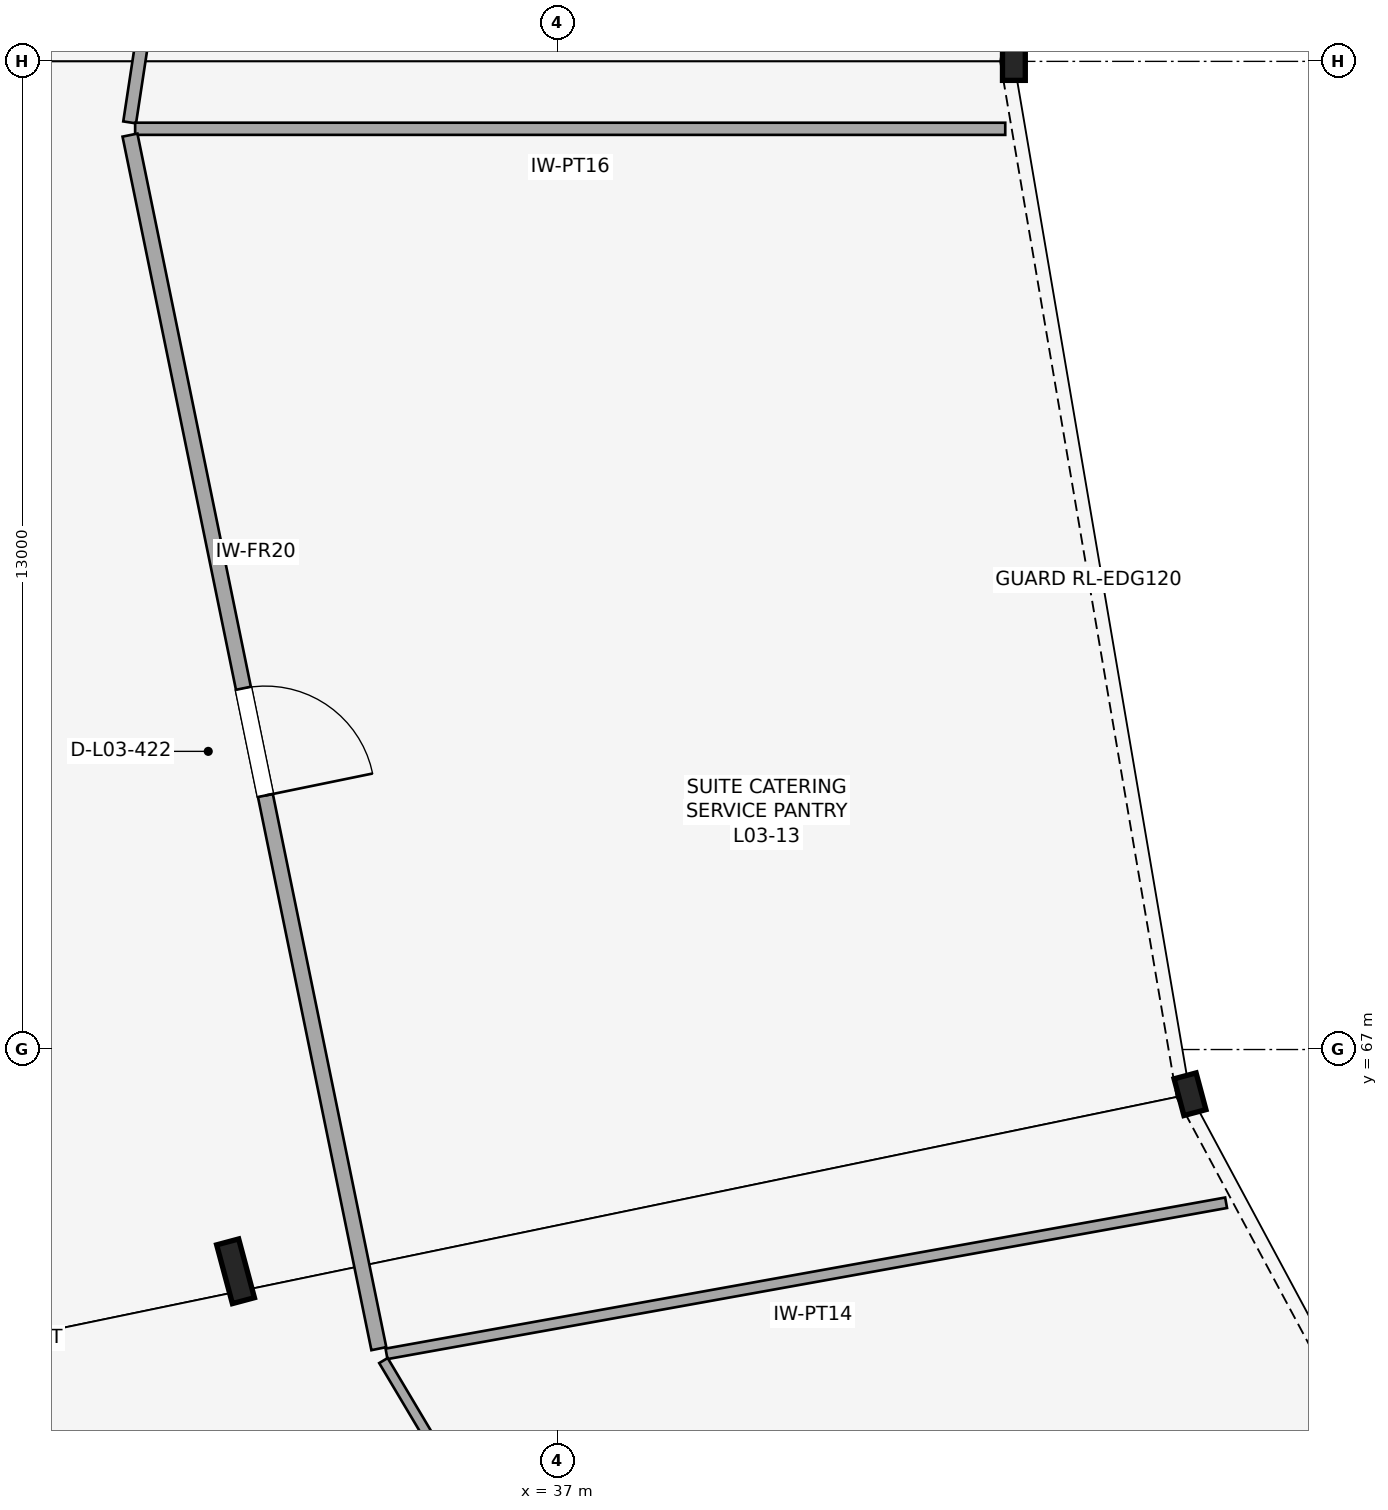
"""IFC4 building model, lengths in metres.
Left out: names, types, materials, properties, quantities, classifications, styles, units other than length and angle.
Written with IfcOpenShell. Run it as: python <this file> out.ifc"""

import sys

from ifc_helpers import new_model, si_unit, direction, frame, frame_2d, origin, origin_2d, place, context, subcontext, project, spatial, rectangle, i_section, extrude, element, fill, save


model = new_model("IFC4")
c1 = context("Model", 3, precision=1e-05, world=origin(), true_north=direction((0.0, 1.0)))
c2 = subcontext(c1, "Body", "Model", "MODEL_VIEW")
j1 = project(units=[si_unit("LENGTHUNIT", "METRE"), si_unit("PLANEANGLEUNIT", "RADIAN")], contexts=[c1])
p1 = place(None, origin())
s1 = spatial("IfcSite", under=j1, at=p1, CompositionType="ELEMENT")
p2 = place(p1, origin())
s2 = spatial("IfcBuilding", under=s1, at=p2, CompositionType="ELEMENT")
p3 = place(p2, frame((0.0, 0.0, 15.6)))
s3 = spatial("IfcBuildingStorey", under=s2, at=p3, CompositionType="ELEMENT", Elevation=15.6)
for number, where, z_axis, x_axis in (
    (1, (43.0, 80.0, 0.0), (0.0, 0.0, 1.0), (-1.0, 0.0, 0.0)),
    (2, (45.317, 66.412, 0.0), (0.0, 0.0, 1.0), (-0.966, -0.259, 0.0)),
):
    element("IfcColumn", number, at=place(p3, frame(where, z_axis=z_axis, x_axis=x_axis)), inside=s3, PredefinedType="COLUMN", context=c2, shape_type="SweptSolid", body=[
        extrude(i_section(OverallWidth=0.3, OverallDepth=0.5, WebThickness=0.014, FlangeThickness=0.028, FilletRadius=0.027, at=origin_2d()), origin(), (0.0, 0.0, 1.0), 3.48),
    ])
p4 = place(p3, frame((32.76, 64.083, 0.0), z_axis=(0.0, 0.0, 1.0), x_axis=(-0.965925826289, -0.258819045103, 0.0)))
e3 = element("IfcColumn", 3, at=p4, inside=s3, PredefinedType="COLUMN", context=c2, shape_type="SweptSolid", body=[
    extrude(i_section(OverallWidth=0.3, OverallDepth=0.8, WebThickness=0.018, FlangeThickness=0.033, FilletRadius=0.03, at=origin_2d()), origin(), (0.0, 0.0, 1.0), 5.2),
])
p5 = place(p3, frame((33.513, 93.309, 0.0), z_axis=(0.0, 0.0, 1.0), x_axis=(-0.150347507433, -0.988633211565, 0.0)))
e4 = element("IfcWall", 4, at=p5, inside=s3, PredefinedType="PARTITIONING", context=c2, shape_type="SweptSolid", body=[
    extrude(rectangle(XDim=14.274, YDim=0.17, at=frame_2d((7.137, 0.0))), origin(), (0.0, 0.0, 1.0), 2.45),
])
p6 = place(p3, frame((42.886, 79.113, 0.0), z_axis=(0.0, 0.0, 1.0), x_axis=(-0.99999999909, 4.2654837e-05, 0.0)))
e5 = element("IfcWall", 5, at=p6, inside=s3, PredefinedType="PARTITIONING", context=c2, shape_type="SweptSolid", body=[
    extrude(rectangle(XDim=11.447, YDim=0.16, at=frame_2d((5.724, 0.0))), origin(), (0.0, 0.0, 1.0), 2.45),
])
p7 = place(p3, frame((31.371, 79.03, 0.0), z_axis=(0.0, 0.0, 1.0), x_axis=(0.200895858008, -0.979612604163, 0.0)))
e6 = element("IfcWall", 6, at=p7, inside=s3, PredefinedType="PARTITIONING", context=c2, shape_type="SweptSolid", body=[
    extrude(rectangle(XDim=16.298, YDim=0.2, at=frame_2d((8.149, 0.0))), origin(), (0.0, 0.0, 1.0), 2.45),
])
p8 = place(p7, frame((7.429, 0.0, 0.0)))
e7 = element("IfcOpeningElement", 7, at=p8, cuts=e6, PredefinedType="OPENING", context=c2, shape_type="SweptSolid", body=[
    extrude(rectangle(XDim=1.44, YDim=2.1, at=frame_2d((0.72, 1.05))), frame((0.0, 0.11, 0.0), z_axis=(0.0, -1.0, 0.0), x_axis=(1.0, 0.0, 0.0)), (0.0, 0.0, 1.0), 0.22),
])
p9 = place(p3, frame((45.792, 64.984, 0.0), z_axis=(0.0, 0.0, 1.0), x_axis=(-0.984189922643, -0.177116335127, 0.0)))
e8 = element("IfcWall", 8, at=p9, inside=s3, PredefinedType="PARTITIONING", context=c2, shape_type="SweptSolid", body=[
    extrude(rectangle(XDim=11.223, YDim=0.14, at=frame_2d((5.612, 0.0))), origin(), (0.0, 0.0, 1.0), 2.45),
])
p10 = place(p3, frame((34.706, 62.908, 0.0), z_axis=(0.0, 0.0, 1.0), x_axis=(0.51138201062, -0.859353500728, 0.0)))
e9 = element("IfcWall", 9, at=p10, inside=s3, PredefinedType="PARTITIONING", context=c2, shape_type="SweptSolid", body=[
    extrude(rectangle(XDim=17.026, YDim=0.13, at=frame_2d((8.513, 0.0))), origin(), (0.0, 0.0, 1.0), 2.45),
])
p11 = place(p10, frame((7.973, 0.0, 0.0)))
e10 = element("IfcOpeningElement", 10, at=p11, cuts=e9, PredefinedType="OPENING", context=c2, shape_type="SweptSolid", body=[
    extrude(rectangle(XDim=1.08, YDim=2.24, at=frame_2d((0.54, 1.12))), frame((0.0, 0.075, 0.0), z_axis=(0.0, -1.0, 0.0), x_axis=(1.0, 0.0, 0.0)), (0.0, 0.0, 1.0), 0.15),
])
p12 = place(p8, origin())
e11 = element("IfcDoor", 11, at=p12, inside=s3, OperationType="SINGLE_SWING_RIGHT", PredefinedType="DOOR", context=c2, shape_type="SweptSolid", body=[
    extrude(rectangle(XDim=1.44, YDim=2.1, at=frame_2d((0.72, 1.05))), frame((0.0, 0.025, 0.0), z_axis=(0.0, -1.0, 0.0), x_axis=(1.0, 0.0, 0.0)), (0.0, 0.0, 1.0), 0.05),
])
fill(e7, e11)
save(model, sys.argv[1])
